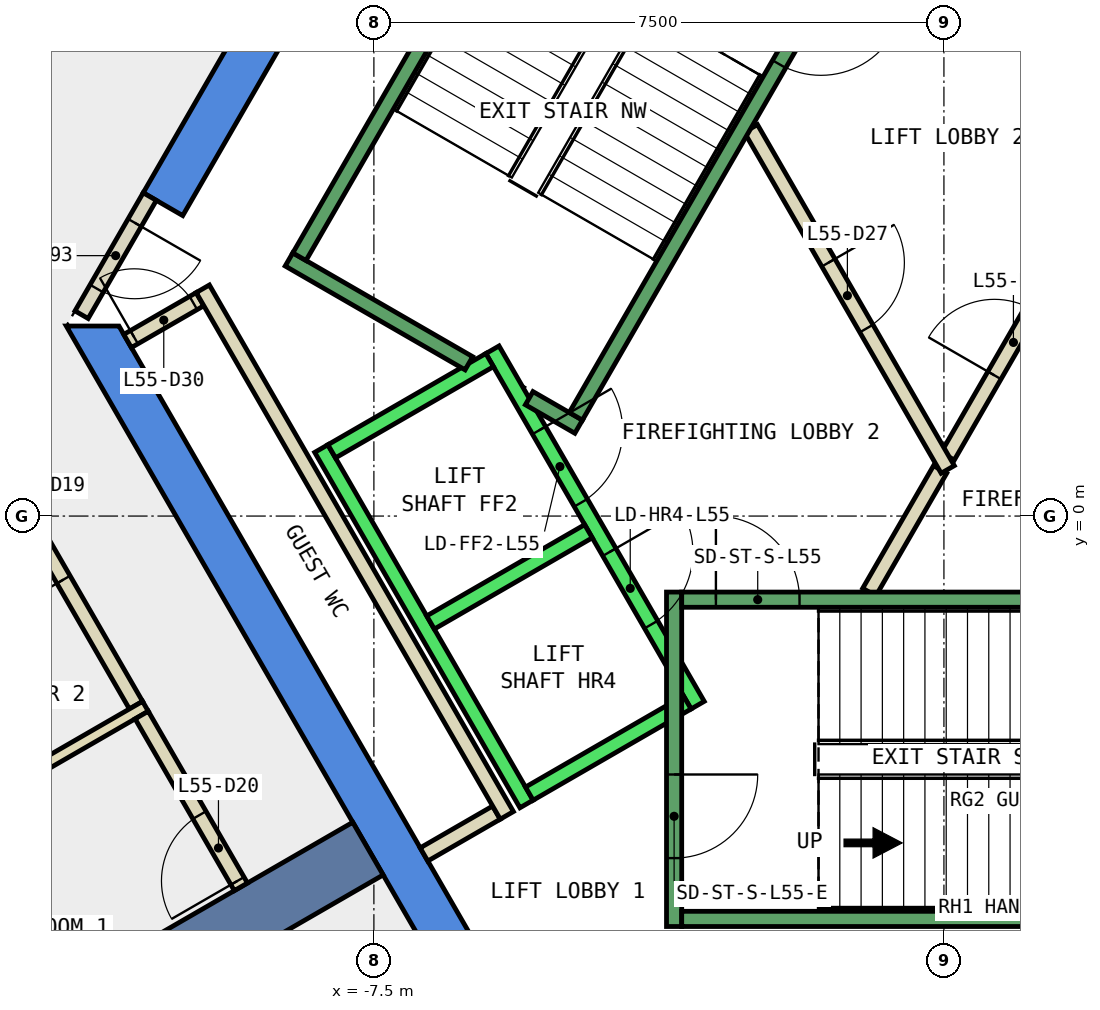
"""IFC4 building model, lengths in metres.
Left out: names, types, materials, properties, quantities, classifications, styles, units other than length and angle.
Written with IfcOpenShell. Run it as: python <this file> out.ifc"""

import sys

from ifc_helpers import new_model, si_unit, direction, frame, frame_2d, origin, place, context, subcontext, project, spatial, polyline, rectangle, outline, extrude, element, fill, save


model = new_model("IFC4")
c1 = context("Model", 3, precision=1e-05, world=origin(), true_north=direction((0.0, 1.0)))
c2 = subcontext(c1, "Body", "Model", "MODEL_VIEW")
j1 = project(units=[si_unit("LENGTHUNIT", "METRE"), si_unit("PLANEANGLEUNIT", "RADIAN")], contexts=[c1])
p1 = place(None, origin())
s1 = spatial("IfcSite", under=j1, at=p1, CompositionType="ELEMENT")
p2 = place(p1, origin())
s2 = spatial("IfcBuilding", under=s1, at=p2, CompositionType="ELEMENT")
p3 = place(p2, frame((0.0, 0.0, 245.0)))
s3 = spatial("IfcBuildingStorey", under=s2, at=p3, CompositionType="ELEMENT", Elevation=245.0)
p4 = place(p3, frame((0.0, 0.0, -0.34)))
e1 = element("IfcWall", 1, at=p4, inside=s3, PredefinedType="SHEAR", context=c2, shape_type="SweptSolid", body=[
    extrude(outline(polyline([(-10.535, 4.253), (-10.015, 3.953), (-5.427, 11.9), (-5.774, 12.5), (-10.535, 4.253)])), origin(), (0.0, 0.0, 1.0), 3.6),
])
p5 = place(p3, frame((0.0, 0.0, -0.34)))
e2 = element("IfcWall", 2, at=p5, inside=s3, PredefinedType="SHEAR", context=c2, shape_type="SweptSolid", body=[
    extrude(outline(polyline([(-11.547, 2.5), (-5.774, -7.5), (-5.427, -6.9), (-10.854, 2.5), (-11.547, 2.5)])), origin(), (0.0, 0.0, 1.0), 3.6),
])
p6 = place(p3, frame((-7.578, -4.375, -0.34), z_axis=(0.0, 0.0, 1.0), x_axis=(-0.866024315419, -0.5000018851, 0.0)))
e3 = element("IfcWall", 3, at=p6, inside=s3, PredefinedType="SHEAR", context=c2, shape_type="SweptSolid", body=[
    extrude(rectangle(XDim=9.0, YDim=0.8, at=frame_2d((4.5, 0.0))), origin(), (0.0, 0.0, 1.0), 3.6),
])
p7 = place(p3, frame((-10.63, -2.488, 0.0), z_axis=(0.0, 0.0, 1.0), x_axis=(-0.500108649621, 0.865962665808, 0.0)))
e4 = element("IfcWall", 4, at=p7, inside=s3, PredefinedType="PARTITIONING", context=c2, shape_type="SweptSolid", body=[
    extrude(rectangle(XDim=4.815, YDim=0.2, at=frame_2d((2.408, 0.0))), origin(), (0.0, 0.0, 1.0), 3.26),
])
p8 = place(p7, frame((1.908, 0.0, 0.0)))
e5 = element("IfcOpeningElement", 5, at=p8, cuts=e4, PredefinedType="OPENING", context=c2, shape_type="SweptSolid", body=[
    extrude(rectangle(XDim=1.0, YDim=2.1, at=frame_2d((0.5, 1.05))), frame((0.0, 0.11, 0.0), z_axis=(0.0, -1.0, 0.0), x_axis=(1.0, 0.0, 0.0)), (0.0, 0.0, 1.0), 0.22),
])
p9 = place(p3, frame((-5.888, -3.902, 0.0), z_axis=(0.0, 0.0, 1.0), x_axis=(-0.86621513555, -0.499671230855, 0.0)))
e6 = element("IfcWall", 6, at=p9, inside=s3, PredefinedType="PARTITIONING", context=c2, shape_type="SweptSolid", body=[
    extrude(rectangle(XDim=1.1, YDim=0.2, at=frame_2d((0.55, 0.0))), origin(), (0.0, 0.0, 1.0), 3.26),
])
p10 = place(p3, frame((-10.741, 2.303, 0.0), z_axis=(0.0, 0.0, 1.0), x_axis=(0.866063652425, 0.499933745558, 0.0)))
e7 = element("IfcWall", 7, at=p10, inside=s3, PredefinedType="PARTITIONING", context=c2, shape_type="SweptSolid", body=[
    extrude(rectangle(XDim=1.1, YDim=0.2, at=frame_2d((0.55, 0.0))), origin(), (0.0, 0.0, 1.0), 3.26),
])
p11 = place(p10, frame((0.1, 0.0, 0.0)))
e8 = element("IfcOpeningElement", 8, at=p11, cuts=e7, PredefinedType="OPENING", context=c2, shape_type="SweptSolid", body=[
    extrude(rectangle(XDim=0.9, YDim=2.1, at=frame_2d((0.45, 1.05))), frame((0.0, 0.11, 0.0), z_axis=(0.0, -1.0, 0.0), x_axis=(1.0, 0.0, 0.0)), (0.0, 0.0, 1.0), 0.22),
])
p12 = place(p3, frame((-9.751, 2.99, 0.0), z_axis=(0.0, 0.0, 1.0), x_axis=(0.500012163284, -0.866018381195, 0.0)))
e9 = element("IfcWall", 9, at=p12, inside=s3, PredefinedType="PARTITIONING", context=c2, shape_type="SweptSolid", body=[
    extrude(rectangle(XDim=8.0, YDim=0.2, at=frame_2d((4.0, 0.0))), origin(), (0.0, 0.0, 1.0), 3.26),
])
p13 = place(p3, frame((-0.982, -1.0, 0.0), z_axis=(0.0, 0.0, 1.0), x_axis=(0.50024047865, 0.865886518847, 0.0)))
e10 = element("IfcWall", 10, at=p13, inside=s3, PredefinedType="PARTITIONING", context=c2, shape_type="SweptSolid", body=[
    extrude(rectangle(XDim=1.863, YDim=0.2, at=frame_2d((0.931, 0.0))), origin(), (0.0, 0.0, 1.0), 3.26),
])
p14 = place(p3, frame((0.05, 0.787, 0.0), z_axis=(0.0, 0.0, 1.0), x_axis=(0.499954076797, 0.866051915934, 0.0)))
e11 = element("IfcWall", 11, at=p14, inside=s3, PredefinedType="PARTITIONING", context=c2, shape_type="SweptSolid", body=[
    extrude(rectangle(XDim=3.558, YDim=0.2, at=frame_2d((1.779, 0.0))), origin(), (0.0, 0.0, 1.0), 3.26),
])
p15 = place(p14, frame((1.229, 0.0, 0.0)))
e12 = element("IfcOpeningElement", 12, at=p15, cuts=e11, PredefinedType="OPENING", context=c2, shape_type="SweptSolid", body=[
    extrude(rectangle(XDim=1.0, YDim=2.1, at=frame_2d((0.5, 1.05))), frame((0.0, 0.11, 0.0), z_axis=(0.0, -1.0, 0.0), x_axis=(1.0, 0.0, 0.0)), (0.0, 0.0, 1.0), 0.22),
])
p16 = place(p3, frame((-2.54, 5.1, 0.0), z_axis=(0.0, 0.0, 1.0), x_axis=(0.499925051871, -0.866068670783, 0.0)))
e13 = element("IfcWall", 13, at=p16, inside=s3, PredefinedType="PARTITIONING", context=c2, shape_type="SweptSolid", body=[
    extrude(rectangle(XDim=5.181, YDim=0.2, at=frame_2d((2.59, 0.0))), origin(), (0.0, 0.0, 1.0), 3.26),
])
p17 = place(p16, frame((2.04, 0.0, 0.0)))
e14 = element("IfcOpeningElement", 14, at=p17, cuts=e13, PredefinedType="OPENING", context=c2, shape_type="SweptSolid", body=[
    extrude(rectangle(XDim=1.0, YDim=2.1, at=frame_2d((0.5, 1.05))), frame((0.0, 0.11, 0.0), z_axis=(0.0, -1.0, 0.0), x_axis=(1.0, 0.0, 0.0)), (0.0, 0.0, 1.0), 0.22),
])
p18 = place(p3, frame((-10.506, -2.503, 0.0), z_axis=(0.0, 0.0, 1.0), x_axis=(-0.866044872465, -0.49996627774, 0.0)))
e15 = element("IfcWall", 15, at=p18, inside=s3, PredefinedType="PARTITIONING", context=c2, shape_type="SweptSolid", body=[
    extrude(rectangle(XDim=5.2, YDim=0.15, at=frame_2d((2.6, 0.0))), origin(), (0.0, 0.0, 1.0), 3.26),
])
p19 = place(p3, frame((-10.449, 4.203, 0.0), z_axis=(0.0, 0.0, 1.0), x_axis=(-0.499914839587, -0.866074565589, 0.0)))
e16 = element("IfcWall", 16, at=p19, inside=s3, PredefinedType="PARTITIONING", context=c2, shape_type="SweptSolid", body=[
    extrude(rectangle(XDim=1.794, YDim=0.2, at=frame_2d((0.897, 0.0))), origin(), (0.0, 0.0, 1.0), 2.4),
])
p20 = place(p19, frame((0.397, 0.0, 0.0)))
e17 = element("IfcOpeningElement", 17, at=p20, cuts=e16, PredefinedType="OPENING", context=c2, shape_type="SweptSolid", body=[
    extrude(rectangle(XDim=1.0, YDim=2.1, at=frame_2d((0.5, 1.05))), frame((0.0, 0.11, 0.0), z_axis=(0.0, -1.0, 0.0), x_axis=(1.0, 0.0, 0.0)), (0.0, 0.0, 1.0), 0.22),
])
p21 = place(p3, frame((-9.25, -4.878, 0.0), z_axis=(0.0, 0.0, 1.0), x_axis=(-0.500032875382, 0.866006422342, 0.0)))
e18 = element("IfcWall", 18, at=p21, inside=s3, PredefinedType="PARTITIONING", context=c2, shape_type="SweptSolid", body=[
    extrude(rectangle(XDim=2.61, YDim=0.2, at=frame_2d((1.305, 0.0))), origin(), (0.0, 0.0, 1.0), 3.26),
])
p22 = place(p21, frame((0.09, 0.0, 0.0)))
e19 = element("IfcOpeningElement", 19, at=p22, cuts=e18, PredefinedType="OPENING", context=c2, shape_type="SweptSolid", body=[
    extrude(rectangle(XDim=1.0, YDim=2.1, at=frame_2d((0.5, 1.05))), frame((0.0, 0.11, 0.0), z_axis=(0.0, -1.0, 0.0), x_axis=(1.0, 0.0, 0.0)), (0.0, 0.0, 1.0), 0.22),
])
p23 = place(p3, frame((-5.94, 2.188, 0.0), z_axis=(0.0, 0.0, 1.0), x_axis=(0.500034260056, -0.866005622828, 0.0)))
e20 = element("IfcWall", 20, at=p23, inside=s3, PredefinedType="STANDARD", context=c2, shape_type="SweptSolid", body=[
    extrude(rectangle(XDim=5.399, YDim=0.2, at=frame_2d((2.7, 0.0))), origin(), (0.0, 0.0, 1.0), 3.26),
])
p24 = place(p23, frame((3.075, 0.0, 0.0)))
e21 = element("IfcOpeningElement", 21, at=p24, cuts=e20, PredefinedType="OPENING", context=c2, shape_type="SweptSolid", body=[
    extrude(rectangle(XDim=1.1, YDim=2.1, at=frame_2d((0.55, 1.05))), frame((0.0, 0.11, 0.0), z_axis=(0.0, -1.0, 0.0), x_axis=(1.0, 0.0, 0.0)), (0.0, 0.0, 1.0), 0.22),
])
p25 = place(p23, frame((1.225, 0.0, 0.0)))
e22 = element("IfcOpeningElement", 22, at=p25, cuts=e20, PredefinedType="OPENING", context=c2, shape_type="SweptSolid", body=[
    extrude(rectangle(XDim=1.1, YDim=2.1, at=frame_2d((0.55, 1.05))), frame((0.0, 0.11, 0.0), z_axis=(0.0, -1.0, 0.0), x_axis=(1.0, 0.0, 0.0)), (0.0, 0.0, 1.0), 0.22),
])
p26 = place(p3, frame((-8.192, 0.888, 0.0), z_axis=(0.0, 0.0, 1.0), x_axis=(0.500034260056, -0.866005622828, 0.0)))
e23 = element("IfcWall", 23, at=p26, inside=s3, PredefinedType="STANDARD", context=c2, shape_type="SweptSolid", body=[
    extrude(rectangle(XDim=5.399, YDim=0.2, at=frame_2d((2.7, 0.0))), origin(), (0.0, 0.0, 1.0), 3.26),
])
for number, where, z_axis, x_axis in (
    (24, (-5.977, 2.052, 0.0), (0.0, 0.0, 1.0), (-0.866, -0.5, 0.0)),
    (25, (-4.677, -0.2, 0.0), (0.0, 0.0, 1.0), (-0.866, -0.5, 0.0)),
):
    element("IfcWall", number, at=place(p3, frame(where, z_axis=z_axis, x_axis=x_axis)), inside=s3, PredefinedType="STANDARD", context=c2, shape_type="SweptSolid", body=[
        extrude(rectangle(XDim=2.399, YDim=0.2, at=frame_2d((1.2, 0.0))), origin(), (0.0, 0.0, 1.0), 3.26),
    ])
p27 = place(p3, frame((-3.377, -2.452, 0.0), z_axis=(0.0, 0.0, 1.0), x_axis=(-0.865955154139, -0.50012165622, 0.0)))
e26 = element("IfcWall", 26, at=p27, inside=s3, PredefinedType="STANDARD", context=c2, shape_type="SweptSolid", body=[
    extrude(rectangle(XDim=2.4, YDim=0.2, at=frame_2d((1.2, 0.0))), origin(), (0.0, 0.0, 1.0), 3.26),
])
p28 = place(p3, frame((-3.55, -1.0, 0.0), z_axis=(0.0, 0.0, 1.0), x_axis=(0.0, -1.0, 0.0)))
e27 = element("IfcWall", 27, at=p28, inside=s3, PredefinedType="STANDARD", context=c2, shape_type="SweptSolid", body=[
    extrude(rectangle(XDim=4.4, YDim=0.2, at=frame_2d((2.2, 0.0))), origin(), (0.0, 0.0, 1.0), 3.26),
])
p29 = place(p28, frame((2.4, 0.0, 0.0)))
e28 = element("IfcOpeningElement", 28, at=p29, cuts=e27, PredefinedType="OPENING", context=c2, shape_type="SweptSolid", body=[
    extrude(rectangle(XDim=1.1, YDim=2.2, at=frame_2d((0.55, 1.1))), frame((0.0, 0.11, 0.0), z_axis=(0.0, -1.0, 0.0), x_axis=(1.0, 0.0, 0.0)), (0.0, 0.0, 1.0), 0.22),
])
p30 = place(p3, frame((-3.45, -1.1, 0.0), z_axis=(0.0, 0.0, 1.0), x_axis=(1.0, 0.0, 0.0)))
e29 = element("IfcWall", 29, at=p30, inside=s3, PredefinedType="STANDARD", context=c2, shape_type="SweptSolid", body=[
    extrude(rectangle(XDim=6.9, YDim=0.2, at=frame_2d((3.45, 0.0))), origin(), (0.0, 0.0, 1.0), 3.26),
])
p31 = place(p30, frame((0.45, 0.0, 0.0)))
e30 = element("IfcOpeningElement", 30, at=p31, cuts=e29, PredefinedType="OPENING", context=c2, shape_type="SweptSolid", body=[
    extrude(rectangle(XDim=1.1, YDim=2.2, at=frame_2d((0.55, 1.1))), frame((0.0, 0.11, 0.0), z_axis=(0.0, -1.0, 0.0), x_axis=(1.0, 0.0, 0.0)), (0.0, 0.0, 1.0), 0.22),
])
p32 = place(p3, frame((-3.45, -5.3, 0.0), z_axis=(0.0, 0.0, 1.0), x_axis=(1.0, 0.0, 0.0)))
e31 = element("IfcWall", 31, at=p32, inside=s3, PredefinedType="STANDARD", context=c2, shape_type="SweptSolid", body=[
    extrude(rectangle(XDim=6.9, YDim=0.2, at=frame_2d((3.45, 0.0))), origin(), (0.0, 0.0, 1.0), 3.26),
])
p33 = place(p3, frame((-6.25, 2.01, 0.0), z_axis=(0.0, 0.0, 1.0), x_axis=(-0.86611865017, 0.499838457731, 0.0)))
e32 = element("IfcWall", 32, at=p33, inside=s3, PredefinedType="STANDARD", context=c2, shape_type="SweptSolid", body=[
    extrude(rectangle(XDim=2.733, YDim=0.2, at=frame_2d((1.366, 0.0))), origin(), (0.0, 0.0, 1.0), 3.26),
])
p34 = place(p3, frame((-4.806, 1.176, 0.0), z_axis=(0.0, 0.0, 1.0), x_axis=(-0.866558586415, 0.499075361355, 0.0)))
e33 = element("IfcWall", 33, at=p34, inside=s3, PredefinedType="STANDARD", context=c2, shape_type="SweptSolid", body=[
    extrude(rectangle(XDim=0.751, YDim=0.2, at=frame_2d((0.376, 0.0))), origin(), (0.0, 0.0, 1.0), 3.26),
])
p35 = place(p3, frame((-1.393, 7.288, 0.0), z_axis=(0.0, 0.0, 1.0), x_axis=(-0.499963383562, -0.866046543262, 0.0)))
e34 = element("IfcWall", 34, at=p35, inside=s3, PredefinedType="STANDARD", context=c2, shape_type="SweptSolid", body=[
    extrude(rectangle(XDim=6.9, YDim=0.2, at=frame_2d((3.45, 0.0))), origin(), (0.0, 0.0, 1.0), 3.26),
])
p36 = place(p35, frame((0.45, 0.0, 0.0)))
e35 = element("IfcOpeningElement", 35, at=p36, cuts=e34, PredefinedType="OPENING", context=c2, shape_type="SweptSolid", body=[
    extrude(rectangle(XDim=1.1, YDim=2.2, at=frame_2d((0.55, 1.1))), frame((0.0, 0.11, 0.0), z_axis=(0.0, -1.0, 0.0), x_axis=(1.0, 0.0, 0.0)), (0.0, 0.0, 1.0), 0.22),
])
p37 = place(p3, frame((-5.03, 9.388, 0.0), z_axis=(0.0, 0.0, 1.0), x_axis=(-0.499978703459, -0.866037698999, 0.0)))
e36 = element("IfcWall", 36, at=p37, inside=s3, PredefinedType="STANDARD", context=c2, shape_type="SweptSolid", body=[
    extrude(rectangle(XDim=6.9, YDim=0.2, at=frame_2d((3.45, 0.0))), origin(), (0.0, 0.0, 1.0), 3.26),
])
p38 = place(p8, origin())
e37 = element("IfcDoor", 37, at=p38, inside=s3, OperationType="SINGLE_SWING_LEFT", PredefinedType="DOOR", context=c2, shape_type="SweptSolid", body=[
    extrude(rectangle(XDim=1.0, YDim=2.1, at=frame_2d((0.5, 1.05))), frame((0.0, 0.025, 0.0), z_axis=(0.0, -1.0, 0.0), x_axis=(1.0, 0.0, 0.0)), (0.0, 0.0, 1.0), 0.05),
])
fill(e5, e37)
p39 = place(p22, origin())
e38 = element("IfcDoor", 38, at=p39, inside=s3, OperationType="SINGLE_SWING_LEFT", PredefinedType="DOOR", context=c2, shape_type="SweptSolid", body=[
    extrude(rectangle(XDim=1.0, YDim=2.1, at=frame_2d((0.5, 1.05))), frame((0.0, 0.025, 0.0), z_axis=(0.0, -1.0, 0.0), x_axis=(1.0, 0.0, 0.0)), (0.0, 0.0, 1.0), 0.05),
])
fill(e19, e38)
p40 = place(p15, origin())
e39 = element("IfcDoor", 39, at=p40, inside=s3, OperationType="SINGLE_SWING_RIGHT", PredefinedType="DOOR", context=c2, shape_type="SweptSolid", body=[
    extrude(rectangle(XDim=1.0, YDim=2.1, at=frame_2d((0.5, 1.05))), frame((0.0, 0.025, 0.0), z_axis=(0.0, -1.0, 0.0), x_axis=(1.0, 0.0, 0.0)), (0.0, 0.0, 1.0), 0.05),
])
fill(e12, e39)
p41 = place(p17, origin())
e40 = element("IfcDoor", 40, at=p41, inside=s3, OperationType="SINGLE_SWING_RIGHT", PredefinedType="DOOR", context=c2, shape_type="SweptSolid", body=[
    extrude(rectangle(XDim=1.0, YDim=2.1, at=frame_2d((0.5, 1.05))), frame((0.0, 0.025, 0.0), z_axis=(0.0, -1.0, 0.0), x_axis=(1.0, 0.0, 0.0)), (0.0, 0.0, 1.0), 0.05),
])
fill(e14, e40)
p42 = place(p11, origin())
e41 = element("IfcDoor", 41, at=p42, inside=s3, OperationType="SINGLE_SWING_RIGHT", PredefinedType="DOOR", context=c2, shape_type="SweptSolid", body=[
    extrude(rectangle(XDim=0.9, YDim=2.1, at=frame_2d((0.45, 1.05))), frame((0.0, 0.025, 0.0), z_axis=(0.0, -1.0, 0.0), x_axis=(1.0, 0.0, 0.0)), (0.0, 0.0, 1.0), 0.05),
])
fill(e8, e41)
p43 = place(p20, origin())
e42 = element("IfcDoor", 42, at=p43, inside=s3, OperationType="SINGLE_SWING_LEFT", PredefinedType="DOOR", context=c2, shape_type="SweptSolid", body=[
    extrude(rectangle(XDim=1.0, YDim=2.1, at=frame_2d((0.5, 1.05))), frame((0.0, 0.025, 0.0), z_axis=(0.0, -1.0, 0.0), x_axis=(1.0, 0.0, 0.0)), (0.0, 0.0, 1.0), 0.05),
])
fill(e17, e42)
p44 = place(p24, origin())
e43 = element("IfcDoor", 43, at=p44, inside=s3, OperationType="SLIDING_TO_LEFT", PredefinedType="DOOR", context=c2, shape_type="SweptSolid", body=[
    extrude(rectangle(XDim=1.1, YDim=2.1, at=frame_2d((0.55, 1.05))), frame((0.0, 0.025, 0.0), z_axis=(0.0, -1.0, 0.0), x_axis=(1.0, 0.0, 0.0)), (0.0, 0.0, 1.0), 0.05),
])
fill(e21, e43)
p45 = place(p25, origin())
e44 = element("IfcDoor", 44, at=p45, inside=s3, OperationType="SLIDING_TO_LEFT", PredefinedType="DOOR", context=c2, shape_type="SweptSolid", body=[
    extrude(rectangle(XDim=1.1, YDim=2.1, at=frame_2d((0.55, 1.05))), frame((0.0, 0.025, 0.0), z_axis=(0.0, -1.0, 0.0), x_axis=(1.0, 0.0, 0.0)), (0.0, 0.0, 1.0), 0.05),
])
fill(e22, e44)
p46 = place(p31, origin())
e45 = element("IfcDoor", 45, at=p46, inside=s3, OperationType="SINGLE_SWING_LEFT", PredefinedType="DOOR", context=c2, shape_type="SweptSolid", body=[
    extrude(rectangle(XDim=1.1, YDim=2.2, at=frame_2d((0.55, 1.1))), frame((0.0, 0.025, 0.0), z_axis=(0.0, -1.0, 0.0), x_axis=(1.0, 0.0, 0.0)), (0.0, 0.0, 1.0), 0.05),
])
fill(e30, e45)
p47 = place(p29, origin())
e46 = element("IfcDoor", 46, at=p47, inside=s3, OperationType="SINGLE_SWING_LEFT", PredefinedType="DOOR", context=c2, shape_type="SweptSolid", body=[
    extrude(rectangle(XDim=1.1, YDim=2.2, at=frame_2d((0.55, 1.1))), frame((0.0, 0.025, 0.0), z_axis=(0.0, -1.0, 0.0), x_axis=(1.0, 0.0, 0.0)), (0.0, 0.0, 1.0), 0.05),
])
fill(e28, e46)
p48 = place(p36, origin())
e47 = element("IfcDoor", 47, at=p48, inside=s3, OperationType="SINGLE_SWING_LEFT", PredefinedType="DOOR", context=c2, shape_type="SweptSolid", body=[
    extrude(rectangle(XDim=1.1, YDim=2.2, at=frame_2d((0.55, 1.1))), frame((0.0, 0.025, 0.0), z_axis=(0.0, -1.0, 0.0), x_axis=(1.0, 0.0, 0.0)), (0.0, 0.0, 1.0), 0.05),
])
fill(e35, e47)
save(model, sys.argv[1])
